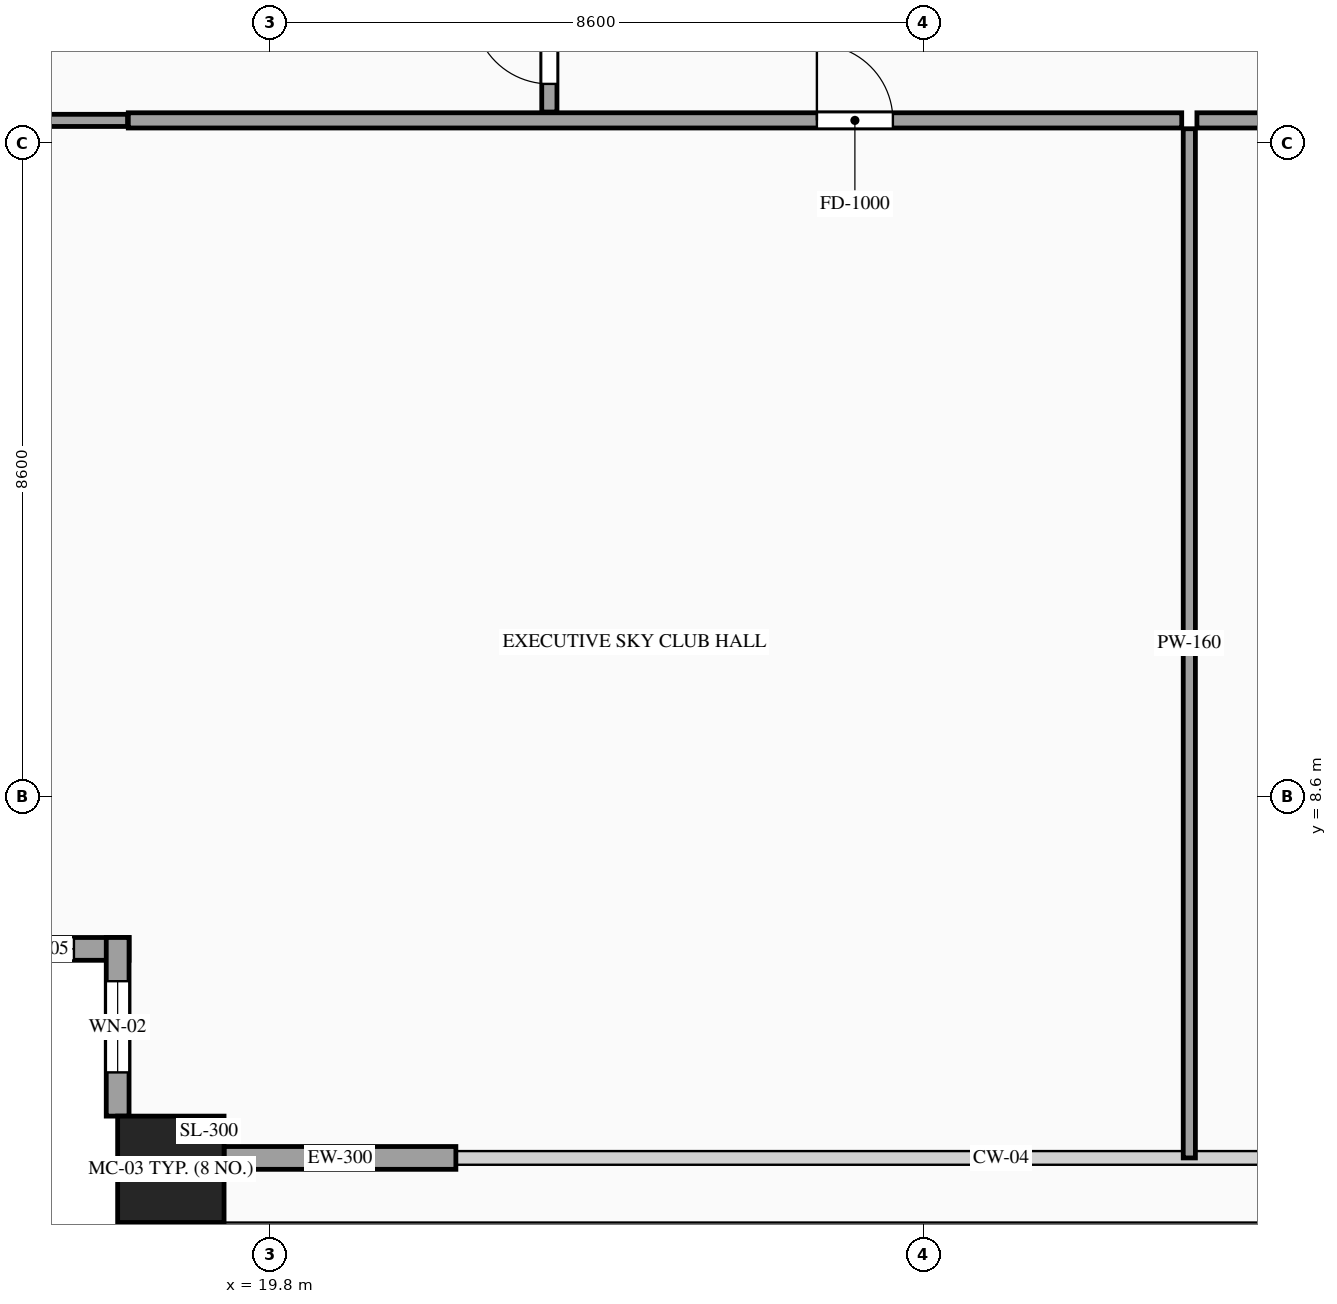
"""IFC4 building model, lengths in metres.
Left out: names, types, materials, properties, quantities, classifications, styles, units other than length and angle.
Written with IfcOpenShell. Run it as: python <this file> out.ifc"""

import sys

from ifc_helpers import new_model, si_unit, direction, frame, frame_2d, origin, origin_2d, place, context, subcontext, project, spatial, rectangle, hollow_rectangle, extrude, source, transform, mapped, element, fill, save


model = new_model("IFC4")
c1 = context("Model", 3, precision=1e-05, world=origin(), true_north=direction((0.0, 1.0)))
c2 = subcontext(c1, "Body", "Model", "MODEL_VIEW")
j1 = project(units=[si_unit("LENGTHUNIT", "METRE"), si_unit("PLANEANGLEUNIT", "RADIAN")], contexts=[c1])
p1 = place(None, origin())
s1 = spatial("IfcSite", under=j1, at=p1, CompositionType="ELEMENT")
p2 = place(p1, origin())
s2 = spatial("IfcBuilding", under=s1, at=p2, CompositionType="ELEMENT")
p3 = place(p2, frame((0.0, 0.0, 171.6)))
s3 = spatial("IfcBuildingStorey", under=s2, at=p3, CompositionType="ELEMENT", Elevation=171.6)
m1 = source(origin(), c2, "Body", "SweptSolid", [
    extrude(hollow_rectangle(XDim=1.4, YDim=1.4, WallThickness=0.06, at=origin_2d()), origin(), (0.0, 0.0, 1.0), 4.8),
])
p4 = place(p3, frame((18.5, 3.7, 0.0), z_axis=(0.0, 0.0, 1.0), x_axis=(1.0, 0.0, 0.0)))
e1 = element("IfcColumn", 1, at=p4, inside=s3, PredefinedType="COLUMN", context=c2, shape_type="MappedRepresentation", body=[
    mapped(m1, transform((0.0, 0.0, 0.0), scale=1.0)),
])
p5 = place(p3, frame((15.6, 6.6, 0.0), z_axis=(0.0, 0.0, 1.0), x_axis=(1.0, 0.0, 0.0)))
e2 = element("IfcWall", 2, at=p5, inside=s3, PredefinedType="SOLIDWALL", context=c2, shape_type="SweptSolid", body=[
    extrude(rectangle(XDim=2.35, YDim=0.3, at=frame_2d((1.175, 0.0))), origin(), (0.0, 0.0, 1.0), 4.52),
])
p6 = place(p5, frame((0.725, 0.0, 0.85)))
e3 = element("IfcOpeningElement", 3, at=p6, cuts=e2, PredefinedType="OPENING", context=c2, shape_type="SweptSolid", body=[
    extrude(rectangle(XDim=0.9, YDim=1.5, at=frame_2d((0.45, 0.75))), frame((0.0, 0.165, 0.0), z_axis=(0.0, -1.0, 0.0), x_axis=(1.0, 0.0, 0.0)), (0.0, 0.0, 1.0), 0.33),
])
p7 = place(p3, frame((17.8, 6.75, 0.0), z_axis=(0.0, 0.0, 1.0), x_axis=(0.0, -1.0, 0.0)))
e4 = element("IfcWall", 4, at=p7, inside=s3, PredefinedType="SOLIDWALL", context=c2, shape_type="SweptSolid", body=[
    extrude(rectangle(XDim=2.35, YDim=0.3, at=frame_2d((1.175, 0.0))), origin(), (0.0, 0.0, 1.0), 4.52),
])
p8 = place(p7, frame((0.575, 0.0, 0.85)))
e5 = element("IfcOpeningElement", 5, at=p8, cuts=e4, PredefinedType="OPENING", context=c2, shape_type="SweptSolid", body=[
    extrude(rectangle(XDim=1.2, YDim=2.1, at=frame_2d((0.6, 1.05))), frame((0.0, 0.165, 0.0), z_axis=(0.0, -1.0, 0.0), x_axis=(1.0, 0.0, 0.0)), (0.0, 0.0, 1.0), 0.33),
])
m2 = source(origin(), c2, "Body", "SweptSolid", [
    extrude(rectangle(XDim=3.05, YDim=0.3, at=frame_2d((1.525, 0.0))), origin(), (0.0, 0.0, 1.0), 4.075),
])
p9 = place(p3, frame((19.2, 3.85, 0.0), z_axis=(0.0, 0.0, 1.0), x_axis=(1.0, 0.0, 0.0)))
e6 = element("IfcWall", 6, at=p9, inside=s3, PredefinedType="SOLIDWALL", context=c2, shape_type="MappedRepresentation", body=[
    mapped(m2, transform((0.0, 0.0, 0.0), scale=1.0)),
])
p10 = place(p3, frame((17.94, 17.5, 0.0), z_axis=(0.0, 0.0, 1.0), x_axis=(1.0, 0.0, 0.0)))
e7 = element("IfcWall", 7, at=p10, inside=s3, PredefinedType="PARTITIONING", context=c2, shape_type="SweptSolid", body=[
    extrude(rectangle(XDim=13.86, YDim=0.2, at=frame_2d((6.93, 0.0))), origin(), (0.0, 0.0, 1.0), 4.52),
])
p11 = place(p10, frame((9.06, 0.0, 0.0)))
e8 = element("IfcOpeningElement", 8, at=p11, cuts=e7, PredefinedType="OPENING", context=c2, shape_type="SweptSolid", body=[
    extrude(rectangle(XDim=1.0, YDim=2.2, at=frame_2d((0.5, 1.1))), frame((0.0, 0.115, 0.0), z_axis=(0.0, -1.0, 0.0), x_axis=(1.0, 0.0, 0.0)), (0.0, 0.0, 1.0), 0.23),
])
m3 = source(origin(), c2, "Body", "SweptSolid", [
    extrude(rectangle(XDim=13.54, YDim=0.16, at=frame_2d((6.77, 0.0))), origin(), (0.0, 0.0, 1.0), 4.52),
])
p12 = place(p3, frame((31.9, 3.85, 0.0), z_axis=(0.0, 0.0, 1.0), x_axis=(0.0, 1.0, 0.0)))
e9 = element("IfcWall", 9, at=p12, inside=s3, PredefinedType="PARTITIONING", context=c2, shape_type="MappedRepresentation", body=[
    mapped(m3, transform((0.0, 0.0, 0.0), scale=1.0)),
])
p13 = place(p3, frame((32.0, 17.5, 0.0), z_axis=(0.0, 0.0, 1.0), x_axis=(1.0, 0.0, 0.0)))
e10 = element("IfcWall", 10, at=p13, inside=s3, PredefinedType="PARTITIONING", context=c2, shape_type="SweptSolid", body=[
    extrude(rectangle(XDim=9.8, YDim=0.2, at=frame_2d((4.9, 0.0))), origin(), (0.0, 0.0, 1.0), 4.52),
])
p14 = place(p13, frame((4.4, 0.0, 0.0)))
e11 = element("IfcOpeningElement", 11, at=p14, cuts=e10, PredefinedType="OPENING", context=c2, shape_type="SweptSolid", body=[
    extrude(rectangle(XDim=1.0, YDim=2.2, at=frame_2d((0.5, 1.1))), frame((0.0, 0.115, 0.0), z_axis=(0.0, -1.0, 0.0), x_axis=(1.0, 0.0, 0.0)), (0.0, 0.0, 1.0), 0.23),
])
p15 = place(p3, frame((23.48, 17.61, 0.0), z_axis=(0.0, 0.0, 1.0), x_axis=(0.0, 1.0, 0.0)))
e12 = element("IfcWall", 12, at=p15, inside=s3, PredefinedType="PARTITIONING", context=c2, shape_type="SweptSolid", body=[
    extrude(rectangle(XDim=1.74, YDim=0.2, at=frame_2d((0.87, 0.0))), origin(), (0.0, 0.0, 1.0), 4.52),
])
p16 = place(p15, frame((0.37, 0.0, 0.0)))
e13 = element("IfcOpeningElement", 13, at=p16, cuts=e12, PredefinedType="OPENING", context=c2, shape_type="SweptSolid", body=[
    extrude(rectangle(XDim=1.0, YDim=2.2, at=frame_2d((0.5, 1.1))), frame((0.0, 0.115, 0.0), z_axis=(0.0, -1.0, 0.0), x_axis=(1.0, 0.0, 0.0)), (0.0, 0.0, 1.0), 0.23),
])
m4 = source(origin(), c2, "Body", "SweptSolid", [
    extrude(rectangle(XDim=2.88, YDim=0.16, at=frame_2d((1.44, 0.0))), origin(), (0.0, 0.0, 1.0), 4.52),
])
p17 = place(p3, frame((15.05, 17.5, 0.0), z_axis=(0.0, 0.0, 1.0), x_axis=(1.0, 0.0, 0.0)))
e14 = element("IfcWall", 14, at=p17, inside=s3, PredefinedType="PARTITIONING", context=c2, shape_type="MappedRepresentation", body=[
    mapped(m4, transform((0.0, 0.0, 0.0), scale=1.0)),
])
m5 = source(origin(), c2, "Body", "SweptSolid", [
    extrude(rectangle(XDim=0.9, YDim=1.5, at=frame_2d((0.45, 0.75))), frame((0.0, 0.03, 0.0), z_axis=(0.0, -1.0, 0.0), x_axis=(1.0, 0.0, 0.0)), (0.0, 0.0, 1.0), 0.06),
])
p18 = place(p6, origin())
e15 = element("IfcWindow", 15, at=p18, inside=s3, PartitioningType="SINGLE_PANEL", PredefinedType="WINDOW", context=c2, shape_type="MappedRepresentation", body=[
    mapped(m5, transform((0.0, 0.0, 0.0), scale=1.0)),
])
fill(e3, e15)
m6 = source(origin(), c2, "Body", "SweptSolid", [
    extrude(rectangle(XDim=1.2, YDim=2.1, at=frame_2d((0.6, 1.05))), frame((0.0, 0.03, 0.0), z_axis=(0.0, -1.0, 0.0), x_axis=(1.0, 0.0, 0.0)), (0.0, 0.0, 1.0), 0.06),
])
p19 = place(p8, origin())
e16 = element("IfcWindow", 16, at=p19, inside=s3, PartitioningType="SINGLE_PANEL", PredefinedType="WINDOW", context=c2, shape_type="MappedRepresentation", body=[
    mapped(m6, transform((0.0, 0.0, 0.0), scale=1.0)),
])
fill(e5, e16)
m7 = source(origin(), c2, "Body", "SweptSolid", [
    extrude(rectangle(XDim=1.0, YDim=2.2, at=frame_2d((0.5, 1.1))), frame((0.0, 0.025, 0.0), z_axis=(0.0, -1.0, 0.0), x_axis=(1.0, 0.0, 0.0)), (0.0, 0.0, 1.0), 0.05),
])
p20 = place(p11, origin())
e17 = element("IfcDoor", 17, at=p20, inside=s3, OperationType="SINGLE_SWING_LEFT", PredefinedType="DOOR", context=c2, shape_type="MappedRepresentation", body=[
    mapped(m7, transform((0.0, 0.0, 0.0), scale=1.0)),
])
fill(e8, e17)
p21 = place(p16, origin())
e18 = element("IfcDoor", 18, at=p21, inside=s3, OperationType="SINGLE_SWING_RIGHT", PredefinedType="DOOR", context=c2, shape_type="MappedRepresentation", body=[
    mapped(m7, transform((0.0, 0.0, 0.0), scale=1.0)),
])
fill(e13, e18)
save(model, sys.argv[1])
